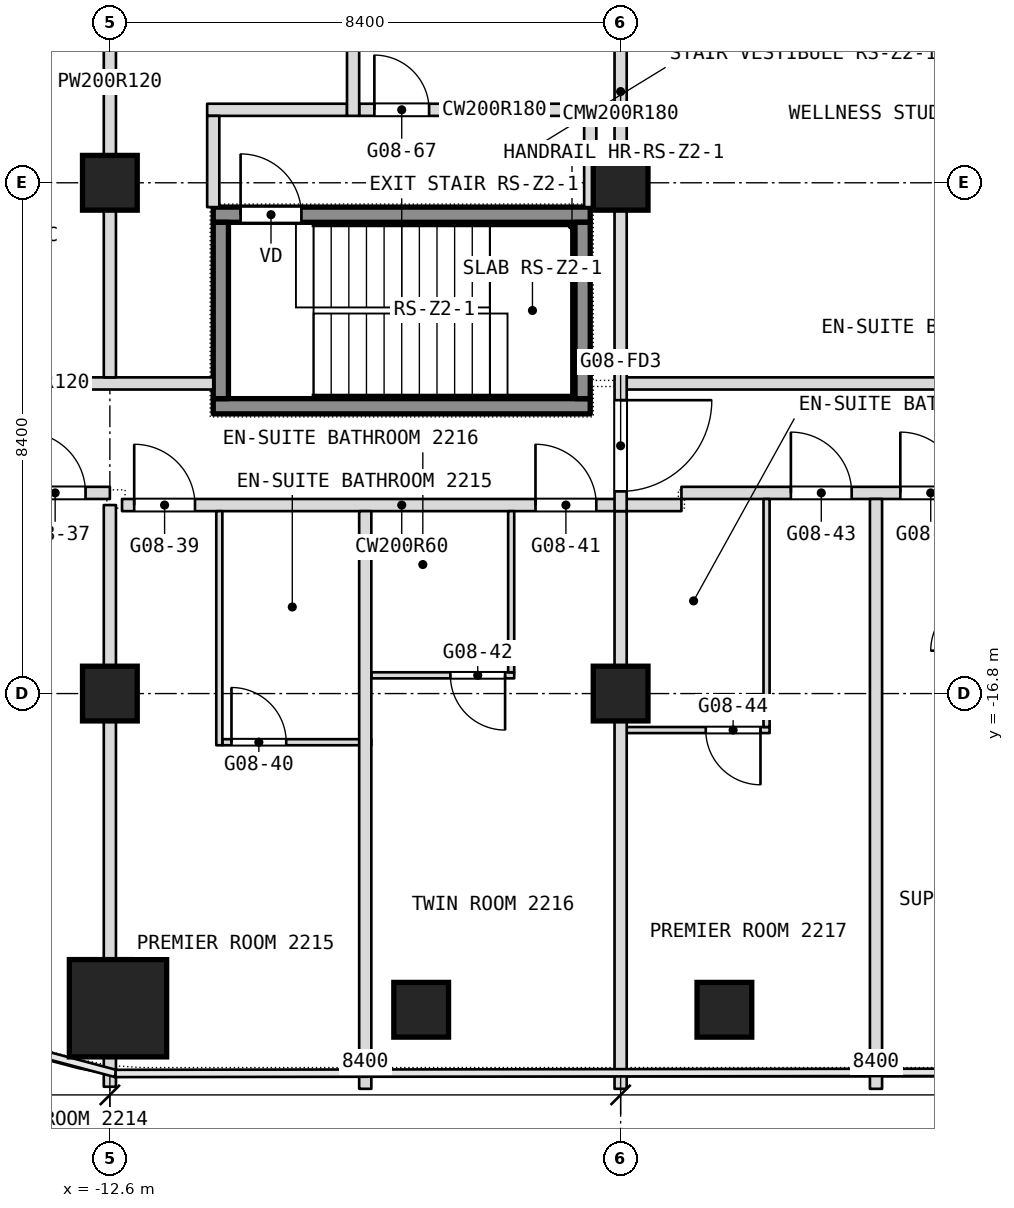
"""IFC4 building model, lengths in metres.
Left out: names, types, materials, properties, quantities, classifications, styles, units other than length and angle.
Written with IfcOpenShell. Run it as: python <this file> out.ifc"""

import sys

from ifc_helpers import new_model, si_unit, direction, frame, frame_2d, origin, origin_2d, place, context, subcontext, project, spatial, rectangle, extrude, element, fill, save


model = new_model("IFC4")
c1 = context("Model", 3, precision=1e-05, world=origin(), true_north=direction((0.0, 1.0)))
c2 = subcontext(c1, "Body", "Model", "MODEL_VIEW")
j1 = project(units=[si_unit("LENGTHUNIT", "METRE"), si_unit("PLANEANGLEUNIT", "RADIAN")], contexts=[c1])
p1 = place(None, origin())
s1 = spatial("IfcSite", under=j1, at=p1, CompositionType="ELEMENT")
p2 = place(p1, origin())
s2 = spatial("IfcBuilding", under=s1, at=p2, CompositionType="ELEMENT")
p3 = place(p2, frame((0.0, 0.0, 104.9)))
s3 = spatial("IfcBuildingStorey", under=s2, at=p3, CompositionType="ELEMENT", Elevation=104.9)
p4 = place(p3, frame((-12.466, -21.975, 0.0), z_axis=(0.0, 0.0, 1.0), x_axis=(1.0, 0.0, 0.0)))
e1 = element("IfcColumn", 1, at=p4, inside=s3, PredefinedType="COLUMN", context=c2, shape_type="SweptSolid", body=[
    extrude(rectangle(XDim=1.6, YDim=1.6, at=origin_2d()), origin(), (0.0, 0.0, 1.0), 3.6),
])
for number, where, z_axis, x_axis in (
    (2, (-12.6, -16.8, 0.0), (0.0, 0.0, 1.0), (1.0, 0.0, 0.0)),
    (3, (-12.6, -8.4, 0.0), (0.0, 0.0, 1.0), (1.0, 0.0, 0.0)),
    (4, (-4.2, -16.8, 0.0), (0.0, 0.0, 1.0), (1.0, 0.0, 0.0)),
    (5, (-4.2, -8.4, 0.0), (0.0, 0.0, 1.0), (1.0, 0.0, 0.0)),
    (6, (-2.493, -22.0, 0.0), (0.0, 0.0, 1.0), (1.0, 0.0, 0.0)),
    (7, (-7.48, -22.0, 0.0), (0.0, 0.0, 1.0), (1.0, 0.0, 0.0)),
):
    element("IfcColumn", number, at=place(p3, frame(where, z_axis=z_axis, x_axis=x_axis)), inside=s3, PredefinedType="COLUMN", context=c2, shape_type="SweptSolid", body=[
        extrude(rectangle(XDim=0.9, YDim=0.9, at=origin_2d()), origin(), (0.0, 0.0, 1.0), 3.6),
    ])
p5 = place(p3, frame((-10.75, -17.6, 0.0), z_axis=(0.0, 0.0, 1.0), x_axis=(1.0, 0.0, 0.0)))
e8 = element("IfcWall", 8, at=p5, inside=s3, PredefinedType="PARTITIONING", context=c2, shape_type="SweptSolid", body=[
    extrude(rectangle(XDim=2.45, YDim=0.1, at=frame_2d((1.225, 0.0))), origin(), (0.0, 0.0, 1.0), 3.34),
])
p6 = place(p5, frame((0.15, 0.0, 0.0)))
e9 = element("IfcOpeningElement", 9, at=p6, cuts=e8, PredefinedType="OPENING", context=c2, shape_type="SweptSolid", body=[
    extrude(rectangle(XDim=0.9, YDim=2.1, at=frame_2d((0.45, 1.05))), frame((0.0, 0.05, 0.0), z_axis=(0.0, -1.0, 0.0), x_axis=(1.0, 0.0, 0.0)), (0.0, 0.0, 1.0), 0.1),
])
p7 = place(p3, frame((-4.1, -17.4, 0.0), z_axis=(0.0, 0.0, 1.0), x_axis=(1.0, 0.0, 0.0)))
e10 = element("IfcWall", 10, at=p7, inside=s3, PredefinedType="PARTITIONING", context=c2, shape_type="SweptSolid", body=[
    extrude(rectangle(XDim=2.35, YDim=0.1, at=frame_2d((1.175, 0.0))), origin(), (0.0, 0.0, 1.0), 3.34),
])
p8 = place(p7, frame((1.3, 0.0, 0.0)))
e11 = element("IfcOpeningElement", 11, at=p8, cuts=e10, PredefinedType="OPENING", context=c2, shape_type="SweptSolid", body=[
    extrude(rectangle(XDim=0.9, YDim=2.1, at=frame_2d((0.45, 1.05))), frame((0.0, 0.05, 0.0), z_axis=(0.0, -1.0, 0.0), x_axis=(1.0, 0.0, 0.0)), (0.0, 0.0, 1.0), 0.1),
])
p9 = place(p3, frame((-8.3, -16.5, 0.0), z_axis=(0.0, 0.0, 1.0), x_axis=(1.0, 0.0, 0.0)))
e12 = element("IfcWall", 12, at=p9, inside=s3, PredefinedType="PARTITIONING", context=c2, shape_type="SweptSolid", body=[
    extrude(rectangle(XDim=2.35, YDim=0.1, at=frame_2d((1.175, 0.0))), origin(), (0.0, 0.0, 1.0), 3.34),
])
p10 = place(p9, frame((1.3, 0.0, 0.0)))
e13 = element("IfcOpeningElement", 13, at=p10, cuts=e12, PredefinedType="OPENING", context=c2, shape_type="SweptSolid", body=[
    extrude(rectangle(XDim=0.9, YDim=2.1, at=frame_2d((0.45, 1.05))), frame((0.0, 0.05, 0.0), z_axis=(0.0, -1.0, 0.0), x_axis=(1.0, 0.0, 0.0)), (0.0, 0.0, 1.0), 0.1),
])
p11 = place(p3, frame((-12.4, -13.7, 0.0), z_axis=(0.0, 0.0, 1.0), x_axis=(1.0, 0.0, 0.0)))
e14 = element("IfcWall", 14, at=p11, inside=s3, PredefinedType="PARTITIONING", context=c2, shape_type="SweptSolid", body=[
    extrude(rectangle(XDim=9.2, YDim=0.2, at=frame_2d((4.6, 0.0))), origin(), (0.0, 0.0, 1.0), 3.34),
])
p12 = place(p11, frame((0.2, 0.0, 0.0)))
e15 = element("IfcOpeningElement", 15, at=p12, cuts=e14, PredefinedType="OPENING", context=c2, shape_type="SweptSolid", body=[
    extrude(rectangle(XDim=1.0, YDim=2.1, at=frame_2d((0.5, 1.05))), frame((0.0, 0.1, 0.0), z_axis=(0.0, -1.0, 0.0), x_axis=(1.0, 0.0, 0.0)), (0.0, 0.0, 1.0), 0.2),
])
p13 = place(p11, frame((6.8, 0.0, 0.0)))
e16 = element("IfcOpeningElement", 16, at=p13, cuts=e14, PredefinedType="OPENING", context=c2, shape_type="SweptSolid", body=[
    extrude(rectangle(XDim=1.0, YDim=2.1, at=frame_2d((0.5, 1.05))), frame((0.0, 0.1, 0.0), z_axis=(0.0, -1.0, 0.0), x_axis=(1.0, 0.0, 0.0)), (0.0, 0.0, 1.0), 0.2),
])
p14 = place(p3, frame((-16.7, -13.5, 0.0), z_axis=(0.0, 0.0, 1.0), x_axis=(1.0, 0.0, 0.0)))
e17 = element("IfcWall", 17, at=p14, inside=s3, PredefinedType="PARTITIONING", context=c2, shape_type="SweptSolid", body=[
    extrude(rectangle(XDim=4.1, YDim=0.2, at=frame_2d((2.05, 0.0))), origin(), (0.0, 0.0, 1.0), 3.34),
])
p15 = place(p14, frame((2.7, 0.0, 0.0)))
e18 = element("IfcOpeningElement", 18, at=p15, cuts=e17, PredefinedType="OPENING", context=c2, shape_type="SweptSolid", body=[
    extrude(rectangle(XDim=1.0, YDim=2.1, at=frame_2d((0.5, 1.05))), frame((0.0, 0.1, 0.0), z_axis=(0.0, -1.0, 0.0), x_axis=(1.0, 0.0, 0.0)), (0.0, 0.0, 1.0), 0.2),
])
p16 = place(p3, frame((-3.2, -13.5, 0.0), z_axis=(0.0, 0.0, 1.0), x_axis=(1.0, 0.0, 0.0)))
e19 = element("IfcWall", 19, at=p16, inside=s3, PredefinedType="PARTITIONING", context=c2, shape_type="SweptSolid", body=[
    extrude(rectangle(XDim=19.9, YDim=0.2, at=frame_2d((9.95, 0.0))), origin(), (0.0, 0.0, 1.0), 3.34),
])
p17 = place(p16, frame((1.8, 0.0, 0.0)))
e20 = element("IfcOpeningElement", 20, at=p17, cuts=e19, PredefinedType="OPENING", context=c2, shape_type="SweptSolid", body=[
    extrude(rectangle(XDim=1.0, YDim=2.1, at=frame_2d((0.5, 1.05))), frame((0.0, 0.1, 0.0), z_axis=(0.0, -1.0, 0.0), x_axis=(1.0, 0.0, 0.0)), (0.0, 0.0, 1.0), 0.2),
])
p18 = place(p16, frame((3.6, 0.0, 0.0)))
e21 = element("IfcOpeningElement", 21, at=p18, cuts=e19, PredefinedType="OPENING", context=c2, shape_type="SweptSolid", body=[
    extrude(rectangle(XDim=1.0, YDim=2.1, at=frame_2d((0.5, 1.05))), frame((0.0, 0.1, 0.0), z_axis=(0.0, -1.0, 0.0), x_axis=(1.0, 0.0, 0.0)), (0.0, 0.0, 1.0), 0.2),
])
p19 = place(p16, frame((7.8, 0.0, 0.0)))
e22 = element("IfcOpeningElement", 22, at=p19, cuts=e19, PredefinedType="OPENING", context=c2, shape_type="SweptSolid", body=[
    extrude(rectangle(XDim=1.0, YDim=2.1, at=frame_2d((0.5, 1.05))), frame((0.0, 0.1, 0.0), z_axis=(0.0, -1.0, 0.0), x_axis=(1.0, 0.0, 0.0)), (0.0, 0.0, 1.0), 0.2),
])
p20 = place(p16, frame((14.4, 0.0, 0.0)))
e23 = element("IfcOpeningElement", 23, at=p20, cuts=e19, PredefinedType="OPENING", context=c2, shape_type="SweptSolid", body=[
    extrude(rectangle(XDim=1.0, YDim=2.1, at=frame_2d((0.5, 1.05))), frame((0.0, 0.1, 0.0), z_axis=(0.0, -1.0, 0.0), x_axis=(1.0, 0.0, 0.0)), (0.0, 0.0, 1.0), 0.2),
])
p21 = place(p16, frame((18.6, 0.0, 0.0)))
e24 = element("IfcOpeningElement", 24, at=p21, cuts=e19, PredefinedType="OPENING", context=c2, shape_type="SweptSolid", body=[
    extrude(rectangle(XDim=1.0, YDim=2.1, at=frame_2d((0.5, 1.05))), frame((0.0, 0.1, 0.0), z_axis=(0.0, -1.0, 0.0), x_axis=(1.0, 0.0, 0.0)), (0.0, 0.0, 1.0), 0.2),
])
p22 = place(p3, frame((-16.7, -11.7, 0.0), z_axis=(0.0, 0.0, 1.0), x_axis=(1.0, 0.0, 0.0)))
e25 = element("IfcWall", 25, at=p22, inside=s3, PredefinedType="PARTITIONING", context=c2, shape_type="SweptSolid", body=[
    extrude(rectangle(XDim=5.8, YDim=0.2, at=frame_2d((2.9, 0.0))), origin(), (0.0, 0.0, 1.0), 3.34),
])
p23 = place(p3, frame((-4.1, -11.7, 0.0), z_axis=(0.0, 0.0, 1.0), x_axis=(1.0, 0.0, 0.0)))
e26 = element("IfcWall", 26, at=p23, inside=s3, PredefinedType="PARTITIONING", context=c2, shape_type="SweptSolid", body=[
    extrude(rectangle(XDim=20.8, YDim=0.2, at=frame_2d((10.4, 0.0))), origin(), (0.0, 0.0, 1.0), 3.34),
])
p24 = place(p3, frame((-11.0, -7.2, 0.0), z_axis=(0.0, 0.0, 1.0), x_axis=(1.0, 0.0, 0.0)))
e27 = element("IfcWall", 27, at=p24, inside=s3, PredefinedType="PARTITIONING", context=c2, shape_type="SweptSolid", body=[
    extrude(rectangle(XDim=2.3, YDim=0.2, at=frame_2d((1.15, 0.0))), origin(), (0.0, 0.0, 1.0), 3.34),
])
p25 = place(p3, frame((-8.5, -7.2, 0.0), z_axis=(0.0, 0.0, 1.0), x_axis=(1.0, 0.0, 0.0)))
e28 = element("IfcWall", 28, at=p25, inside=s3, PredefinedType="PARTITIONING", context=c2, shape_type="SweptSolid", body=[
    extrude(rectangle(XDim=3.7, YDim=0.2, at=frame_2d((1.85, 0.0))), origin(), (0.0, 0.0, 1.0), 3.34),
])
p26 = place(p25, frame((0.25, 0.0, 0.0)))
e29 = element("IfcOpeningElement", 29, at=p26, cuts=e28, PredefinedType="OPENING", context=c2, shape_type="SweptSolid", body=[
    extrude(rectangle(XDim=0.9, YDim=2.1, at=frame_2d((0.45, 1.05))), frame((0.0, 0.1, 0.0), z_axis=(0.0, -1.0, 0.0), x_axis=(1.0, 0.0, 0.0)), (0.0, 0.0, 1.0), 0.2),
])
p27 = place(p3, frame((0.0, -23.3, 0.0), z_axis=(0.0, 0.0, 1.0), x_axis=(0.0, 1.0, 0.0)))
e30 = element("IfcWall", 30, at=p27, inside=s3, PredefinedType="PARTITIONING", context=c2, shape_type="SweptSolid", body=[
    extrude(rectangle(XDim=9.7, YDim=0.2, at=frame_2d((4.85, 0.0))), origin(), (0.0, 0.0, 1.0), 3.34),
])
p28 = place(p3, frame((-1.8, -17.35, 0.0), z_axis=(0.0, 0.0, 1.0), x_axis=(0.0, 1.0, 0.0)))
e31 = element("IfcWall", 31, at=p28, inside=s3, PredefinedType="PARTITIONING", context=c2, shape_type="SweptSolid", body=[
    extrude(rectangle(XDim=3.75, YDim=0.1, at=frame_2d((1.875, 0.0))), origin(), (0.0, 0.0, 1.0), 3.34),
])
p29 = place(p3, frame((-4.2, -23.3, 0.0), z_axis=(0.0, 0.0, 1.0), x_axis=(0.0, 1.0, 0.0)))
e32 = element("IfcWall", 32, at=p29, inside=s3, PredefinedType="PARTITIONING", context=c2, shape_type="SweptSolid", body=[
    extrude(rectangle(XDim=9.5, YDim=0.2, at=frame_2d((4.75, 0.0))), origin(), (0.0, 0.0, 1.0), 3.34),
])
p30 = place(p3, frame((-4.2, -13.8, 0.0), z_axis=(0.0, 0.0, 1.0), x_axis=(0.0, 1.0, 0.0)))
e33 = element("IfcWall", 33, at=p30, inside=s3, PredefinedType="PARTITIONING", context=c2, shape_type="SweptSolid", body=[
    extrude(rectangle(XDim=13.8, YDim=0.2, at=frame_2d((6.9, 0.0))), origin(), (0.0, 0.0, 1.0), 3.34),
])
p31 = place(p30, frame((12.15, 0.0, 0.0)))
e34 = element("IfcOpeningElement", 34, at=p31, cuts=e33, PredefinedType="OPENING", context=c2, shape_type="SweptSolid", body=[
    extrude(rectangle(XDim=1.5, YDim=2.1, at=frame_2d((0.75, 1.05))), frame((0.0, 0.1, 0.0), z_axis=(0.0, -1.0, 0.0), x_axis=(1.0, 0.0, 0.0)), (0.0, 0.0, 1.0), 0.2),
])
p32 = place(p30, frame((0.325, 0.0, 0.0)))
e35 = element("IfcOpeningElement", 35, at=p32, cuts=e33, PredefinedType="OPENING", context=c2, shape_type="SweptSolid", body=[
    extrude(rectangle(XDim=1.5, YDim=2.1, at=frame_2d((0.75, 1.05))), frame((0.0, 0.1, 0.0), z_axis=(0.0, -1.0, 0.0), x_axis=(1.0, 0.0, 0.0)), (0.0, 0.0, 1.0), 0.2),
])
p33 = place(p3, frame((-4.7, -8.8, 0.0), z_axis=(0.0, 0.0, 1.0), x_axis=(0.0, 1.0, 0.0)))
e36 = element("IfcWall", 36, at=p33, inside=s3, PredefinedType="PARTITIONING", context=c2, shape_type="SweptSolid", body=[
    extrude(rectangle(XDim=1.7, YDim=0.2, at=frame_2d((0.85, 0.0))), origin(), (0.0, 0.0, 1.0), 3.34),
])
p34 = place(p3, frame((-6.0, -16.45, 0.0), z_axis=(0.0, 0.0, 1.0), x_axis=(0.0, 1.0, 0.0)))
e37 = element("IfcWall", 37, at=p34, inside=s3, PredefinedType="PARTITIONING", context=c2, shape_type="SweptSolid", body=[
    extrude(rectangle(XDim=2.65, YDim=0.1, at=frame_2d((1.325, 0.0))), origin(), (0.0, 0.0, 1.0), 3.34),
])
p35 = place(p3, frame((-8.4, -23.3, 0.0), z_axis=(0.0, 0.0, 1.0), x_axis=(0.0, 1.0, 0.0)))
e38 = element("IfcWall", 38, at=p35, inside=s3, PredefinedType="PARTITIONING", context=c2, shape_type="SweptSolid", body=[
    extrude(rectangle(XDim=9.5, YDim=0.2, at=frame_2d((4.75, 0.0))), origin(), (0.0, 0.0, 1.0), 3.34),
])
p36 = place(p3, frame((-8.6, -7.3, 0.0), z_axis=(0.0, 0.0, 1.0), x_axis=(0.0, 1.0, 0.0)))
e39 = element("IfcWall", 39, at=p36, inside=s3, PredefinedType="PARTITIONING", context=c2, shape_type="SweptSolid", body=[
    extrude(rectangle(XDim=5.6, YDim=0.2, at=frame_2d((2.8, 0.0))), origin(), (0.0, 0.0, 1.0), 3.34),
])
p37 = place(p3, frame((-10.8, -17.65, 0.0), z_axis=(0.0, 0.0, 1.0), x_axis=(0.0, 1.0, 0.0)))
e40 = element("IfcWall", 40, at=p37, inside=s3, PredefinedType="PARTITIONING", context=c2, shape_type="SweptSolid", body=[
    extrude(rectangle(XDim=3.85, YDim=0.1, at=frame_2d((1.925, 0.0))), origin(), (0.0, 0.0, 1.0), 3.34),
])
p38 = place(p3, frame((-10.9, -8.8, 0.0), z_axis=(0.0, 0.0, 1.0), x_axis=(0.0, 1.0, 0.0)))
e41 = element("IfcWall", 41, at=p38, inside=s3, PredefinedType="PARTITIONING", context=c2, shape_type="SweptSolid", body=[
    extrude(rectangle(XDim=1.5, YDim=0.2, at=frame_2d((0.75, 0.0))), origin(), (0.0, 0.0, 1.0), 3.34),
])
p39 = place(p3, frame((-12.6, -23.266, 0.0), z_axis=(0.0, 0.0, 1.0), x_axis=(0.0, 1.0, 0.0)))
e42 = element("IfcWall", 42, at=p39, inside=s3, PredefinedType="PARTITIONING", context=c2, shape_type="SweptSolid", body=[
    extrude(rectangle(XDim=0.491, YDim=0.2, at=frame_2d((0.246, 0.0))), origin(), (0.0, 0.0, 1.0), 3.34),
])
p40 = place(p3, frame((-12.6, -21.175, 0.0), z_axis=(0.0, 0.0, 1.0), x_axis=(0.0, 1.0, 0.0)))
e43 = element("IfcWall", 43, at=p40, inside=s3, PredefinedType="PARTITIONING", context=c2, shape_type="SweptSolid", body=[
    extrude(rectangle(XDim=7.475, YDim=0.2, at=frame_2d((3.738, 0.0))), origin(), (0.0, 0.0, 1.0), 3.34),
])
p41 = place(p3, frame((-12.6, -11.6, 0.0), z_axis=(0.0, 0.0, 1.0), x_axis=(0.0, 1.0, 0.0)))
e44 = element("IfcWall", 44, at=p41, inside=s3, PredefinedType="PARTITIONING", context=c2, shape_type="SweptSolid", body=[
    extrude(rectangle(XDim=9.7, YDim=0.2, at=frame_2d((4.85, 0.0))), origin(), (0.0, 0.0, 1.0), 3.34),
])
p42 = place(p3, frame((-10.9, -12.075, 0.1), z_axis=(0.0, 0.0, 1.0), x_axis=(1.0, 0.0, 0.0)))
e45 = element("IfcWall", 45, at=p42, inside=s3, PredefinedType="SHEAR", context=c2, shape_type="SweptSolid", body=[
    extrude(rectangle(XDim=6.2, YDim=0.25, at=frame_2d((3.1, 0.0))), origin(), (0.0, 0.0, 1.0), 3.6),
])
p43 = place(p3, frame((-10.9, -8.925, 0.1), z_axis=(0.0, 0.0, 1.0), x_axis=(1.0, 0.0, 0.0)))
e46 = element("IfcWall", 46, at=p43, inside=s3, PredefinedType="SHEAR", context=c2, shape_type="SweptSolid", body=[
    extrude(rectangle(XDim=6.2, YDim=0.25, at=frame_2d((3.1, 0.0))), origin(), (0.0, 0.0, 1.0), 3.6),
])
p44 = place(p43, frame((0.45, 0.0, 0.0)))
e47 = element("IfcOpeningElement", 47, at=p44, cuts=e46, PredefinedType="OPENING", context=c2, shape_type="SweptSolid", body=[
    extrude(rectangle(XDim=1.0, YDim=2.1, at=frame_2d((0.5, 1.05))), frame((0.0, 0.125, 0.0), z_axis=(0.0, -1.0, 0.0), x_axis=(1.0, 0.0, 0.0)), (0.0, 0.0, 1.0), 0.25),
])
for number, where, z_axis, x_axis in (
    (48, (-10.775, -11.95, 0.1), (0.0, 0.0, 1.0), (0.0, 1.0, 0.0)),
    (49, (-4.825, -11.95, 0.1), (0.0, 0.0, 1.0), (0.0, 1.0, 0.0)),
):
    element("IfcWall", number, at=place(p3, frame(where, z_axis=z_axis, x_axis=x_axis)), inside=s3, PredefinedType="SHEAR", context=c2, shape_type="SweptSolid", body=[
        extrude(rectangle(XDim=2.9, YDim=0.25, at=frame_2d((1.45, 0.0))), origin(), (0.0, 0.0, 1.0), 3.6),
    ])
p45 = place(p6, origin())
e50 = element("IfcDoor", 50, at=p45, inside=s3, OperationType="SINGLE_SWING_LEFT", PredefinedType="DOOR", context=c2, shape_type="SweptSolid", body=[
    extrude(rectangle(XDim=0.9, YDim=2.1, at=frame_2d((0.45, 1.05))), frame((0.0, 0.025, 0.0), z_axis=(0.0, -1.0, 0.0), x_axis=(1.0, 0.0, 0.0)), (0.0, 0.0, 1.0), 0.05),
])
fill(e9, e50)
p46 = place(p8, origin())
e51 = element("IfcDoor", 51, at=p46, inside=s3, OperationType="SINGLE_SWING_RIGHT", PredefinedType="DOOR", context=c2, shape_type="SweptSolid", body=[
    extrude(rectangle(XDim=0.9, YDim=2.1, at=frame_2d((0.45, 1.05))), frame((0.0, 0.025, 0.0), z_axis=(0.0, -1.0, 0.0), x_axis=(1.0, 0.0, 0.0)), (0.0, 0.0, 1.0), 0.05),
])
fill(e11, e51)
p47 = place(p10, origin())
e52 = element("IfcDoor", 52, at=p47, inside=s3, OperationType="SINGLE_SWING_RIGHT", PredefinedType="DOOR", context=c2, shape_type="SweptSolid", body=[
    extrude(rectangle(XDim=0.9, YDim=2.1, at=frame_2d((0.45, 1.05))), frame((0.0, 0.025, 0.0), z_axis=(0.0, -1.0, 0.0), x_axis=(1.0, 0.0, 0.0)), (0.0, 0.0, 1.0), 0.05),
])
fill(e13, e52)
p48 = place(p12, origin())
e53 = element("IfcDoor", 53, at=p48, inside=s3, OperationType="SINGLE_SWING_RIGHT", PredefinedType="DOOR", context=c2, shape_type="SweptSolid", body=[
    extrude(rectangle(XDim=1.0, YDim=2.1, at=frame_2d((0.5, 1.05))), frame((0.0, 0.025, 0.0), z_axis=(0.0, -1.0, 0.0), x_axis=(1.0, 0.0, 0.0)), (0.0, 0.0, 1.0), 0.05),
])
fill(e15, e53)
p49 = place(p13, origin())
e54 = element("IfcDoor", 54, at=p49, inside=s3, OperationType="SINGLE_SWING_LEFT", PredefinedType="DOOR", context=c2, shape_type="SweptSolid", body=[
    extrude(rectangle(XDim=1.0, YDim=2.1, at=frame_2d((0.5, 1.05))), frame((0.0, 0.025, 0.0), z_axis=(0.0, -1.0, 0.0), x_axis=(1.0, 0.0, 0.0)), (0.0, 0.0, 1.0), 0.05),
])
fill(e16, e54)
p50 = place(p15, origin())
e55 = element("IfcDoor", 55, at=p50, inside=s3, OperationType="SINGLE_SWING_LEFT", PredefinedType="DOOR", context=c2, shape_type="SweptSolid", body=[
    extrude(rectangle(XDim=1.0, YDim=2.1, at=frame_2d((0.5, 1.05))), frame((0.0, 0.025, 0.0), z_axis=(0.0, -1.0, 0.0), x_axis=(1.0, 0.0, 0.0)), (0.0, 0.0, 1.0), 0.05),
])
fill(e18, e55)
p51 = place(p17, origin())
e56 = element("IfcDoor", 56, at=p51, inside=s3, OperationType="SINGLE_SWING_LEFT", PredefinedType="DOOR", context=c2, shape_type="SweptSolid", body=[
    extrude(rectangle(XDim=1.0, YDim=2.1, at=frame_2d((0.5, 1.05))), frame((0.0, 0.025, 0.0), z_axis=(0.0, -1.0, 0.0), x_axis=(1.0, 0.0, 0.0)), (0.0, 0.0, 1.0), 0.05),
])
fill(e20, e56)
p52 = place(p18, origin())
e57 = element("IfcDoor", 57, at=p52, inside=s3, OperationType="SINGLE_SWING_LEFT", PredefinedType="DOOR", context=c2, shape_type="SweptSolid", body=[
    extrude(rectangle(XDim=1.0, YDim=2.1, at=frame_2d((0.5, 1.05))), frame((0.0, 0.025, 0.0), z_axis=(0.0, -1.0, 0.0), x_axis=(1.0, 0.0, 0.0)), (0.0, 0.0, 1.0), 0.05),
])
fill(e21, e57)
p53 = place(p26, origin())
e58 = element("IfcDoor", 58, at=p53, inside=s3, OperationType="SINGLE_SWING_RIGHT", PredefinedType="DOOR", context=c2, shape_type="SweptSolid", body=[
    extrude(rectangle(XDim=0.9, YDim=2.1, at=frame_2d((0.45, 1.05))), frame((0.0, 0.025, 0.0), z_axis=(0.0, -1.0, 0.0), x_axis=(1.0, 0.0, 0.0)), (0.0, 0.0, 1.0), 0.05),
])
fill(e29, e58)
p54 = place(p44, origin())
e59 = element("IfcDoor", 59, at=p54, inside=s3, OperationType="SINGLE_SWING_LEFT", PredefinedType="DOOR", context=c2, shape_type="SweptSolid", body=[
    extrude(rectangle(XDim=1.0, YDim=2.1, at=frame_2d((0.5, 1.05))), frame((0.0, 0.025, 0.0), z_axis=(0.0, -1.0, 0.0), x_axis=(1.0, 0.0, 0.0)), (0.0, 0.0, 1.0), 0.05),
])
fill(e47, e59)
p55 = place(p32, origin())
e60 = element("IfcDoor", 60, at=p55, inside=s3, OperationType="DOUBLE_DOOR_DOUBLE_SWING", PredefinedType="DOOR", context=c2, shape_type="SweptSolid", body=[
    extrude(rectangle(XDim=1.5, YDim=2.1, at=frame_2d((0.75, 1.05))), frame((0.0, 0.025, 0.0), z_axis=(0.0, -1.0, 0.0), x_axis=(1.0, 0.0, 0.0)), (0.0, 0.0, 1.0), 0.05),
])
fill(e35, e60)
save(model, sys.argv[1])
